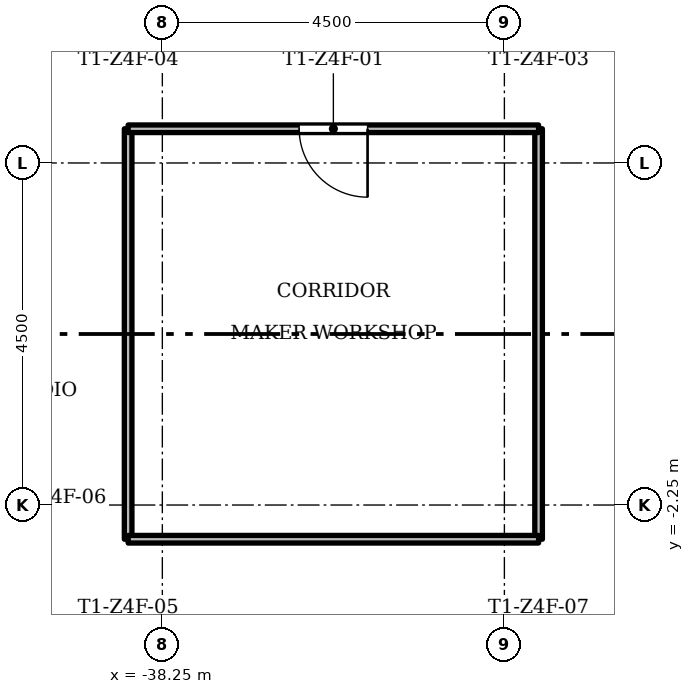
"""IFC4 building model, lengths in metres.
Left out: names, types, materials, properties, quantities, classifications, styles, units other than length and angle.
Written with IfcOpenShell. Run it as: python <this file> out.ifc"""

import sys

from ifc_helpers import new_model, si_unit, direction, frame, frame_2d, origin, place, context, subcontext, project, spatial, rectangle, extrude, element, fill, save


model = new_model("IFC4")
c1 = context("Model", 3, precision=1e-05, world=origin(), true_north=direction((0.0, 1.0)))
c2 = subcontext(c1, "Body", "Model", "MODEL_VIEW")
j1 = project(units=[si_unit("LENGTHUNIT", "METRE"), si_unit("PLANEANGLEUNIT", "RADIAN")], contexts=[c1])
p1 = place(None, origin())
s1 = spatial("IfcSite", under=j1, at=p1, CompositionType="ELEMENT")
p2 = place(p1, origin())
s2 = spatial("IfcBuilding", under=s1, at=p2, CompositionType="ELEMENT")
p3 = place(p2, frame((0.0, 0.0, 219.8)))
s3 = spatial("IfcBuildingStorey", under=s2, at=p3, CompositionType="ELEMENT", Elevation=219.8)
for number, where, z_axis, x_axis in (
    (1, (-38.7, -2.7, 0.0), (0.0, 0.0, 1.0), (0.0, 1.0, 0.0)),
    (2, (-33.3, -2.7, 0.0), (0.0, 0.0, 1.0), (0.0, 1.0, 0.0)),
    (3, (-38.7, -2.7, 0.0), (0.0, 0.0, 1.0), (1.0, 0.0, 0.0)),
):
    element("IfcWall", number, at=place(p3, frame(where, z_axis=z_axis, x_axis=x_axis)), inside=s3, PredefinedType="PARTITIONING", context=c2, shape_type="SweptSolid", body=[
        extrude(rectangle(XDim=5.4, YDim=0.1, at=frame_2d((2.7, 0.0))), origin(), (0.0, 0.0, 1.0), 3.0),
    ])
p4 = place(p3, frame((-38.7, 2.7, 0.0), z_axis=(0.0, 0.0, 1.0), x_axis=(1.0, 0.0, 0.0)))
e4 = element("IfcWall", 4, at=p4, inside=s3, PredefinedType="PARTITIONING", context=c2, shape_type="SweptSolid", body=[
    extrude(rectangle(XDim=5.4, YDim=0.1, at=frame_2d((2.7, 0.0))), origin(), (0.0, 0.0, 1.0), 3.0),
])
p5 = place(p4, frame((2.25, 0.0, 0.0)))
e5 = element("IfcOpeningElement", 5, at=p5, cuts=e4, PredefinedType="OPENING", context=c2, shape_type="SweptSolid", body=[
    extrude(rectangle(XDim=0.9, YDim=2.1, at=frame_2d((0.45, 1.05))), frame((0.0, 0.06, 0.0), z_axis=(0.0, -1.0, 0.0), x_axis=(1.0, 0.0, 0.0)), (0.0, 0.0, 1.0), 0.12),
])
p6 = place(p5, origin())
e6 = element("IfcDoor", 6, at=p6, inside=s3, OperationType="SINGLE_SWING_RIGHT", PredefinedType="DOOR", context=c2, shape_type="SweptSolid", body=[
    extrude(rectangle(XDim=0.9, YDim=2.1, at=frame_2d((0.45, 1.05))), frame((0.0, 0.025, 0.0), z_axis=(0.0, -1.0, 0.0), x_axis=(1.0, 0.0, 0.0)), (0.0, 0.0, 1.0), 0.05),
])
fill(e5, e6)
save(model, sys.argv[1])
